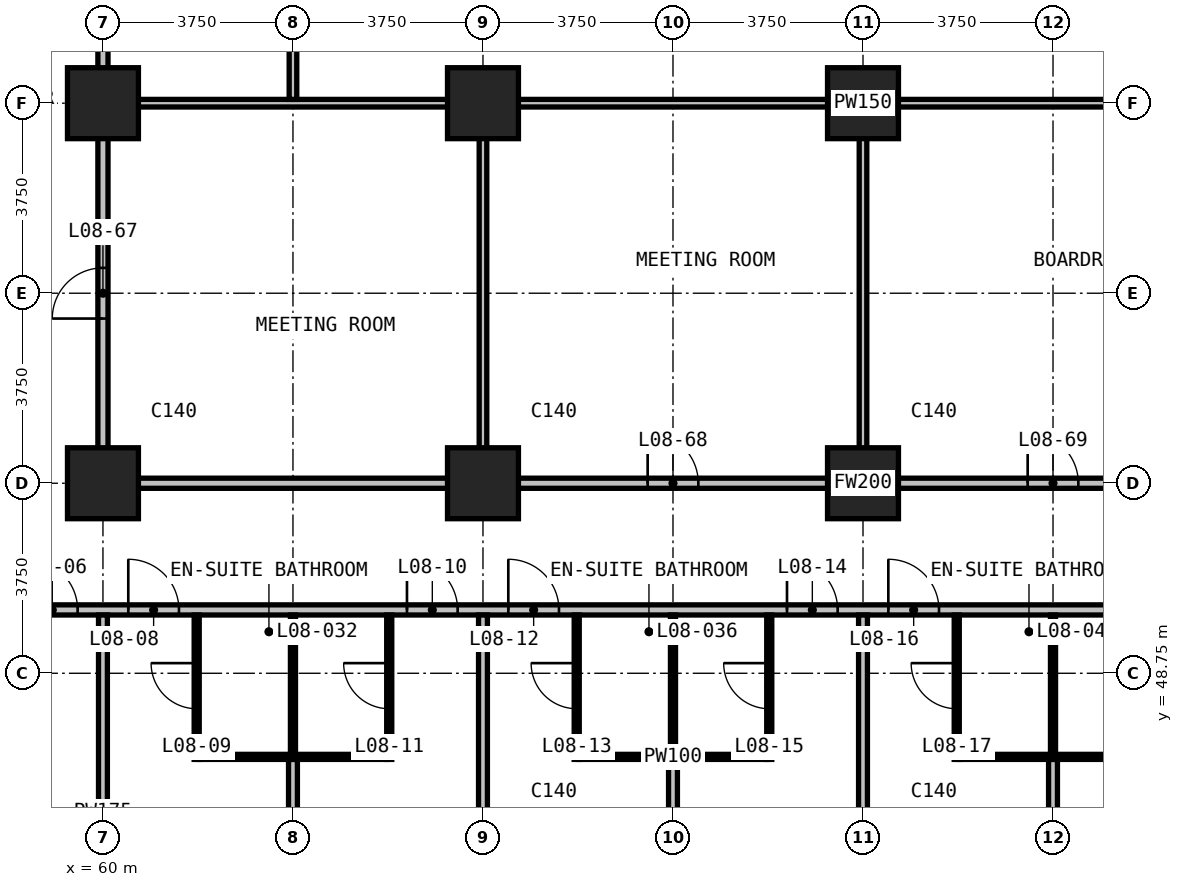
"""IFC4 building model, lengths in metres.
Left out: names, types, materials, properties, quantities, classifications, styles, units other than length and angle.
Written with IfcOpenShell. Run it as: python <this file> out.ifc"""

import sys

from ifc_helpers import new_model, si_unit, direction, frame, frame_2d, origin, origin_2d, place, context, subcontext, project, spatial, rectangle, extrude, element, fill, save


model = new_model("IFC4")
c1 = context("Model", 3, precision=1e-05, world=origin(), true_north=direction((0.0, 1.0)))
c2 = subcontext(c1, "Body", "Model", "MODEL_VIEW")
j1 = project(units=[si_unit("LENGTHUNIT", "METRE"), si_unit("PLANEANGLEUNIT", "RADIAN")], contexts=[c1])
p1 = place(None, origin())
s1 = spatial("IfcSite", under=j1, at=p1, CompositionType="ELEMENT")
p2 = place(p1, origin())
s2 = spatial("IfcBuilding", under=s1, at=p2, CompositionType="ELEMENT")
p3 = place(p2, frame((0.0, 0.0, 46.1)))
s3 = spatial("IfcBuildingStorey", under=s2, at=p3, CompositionType="ELEMENT", Elevation=46.1)
for number, where, z_axis, x_axis in (
    (1, (60.0, 52.5, 0.0), (0.0, 0.0, 1.0), (1.0, 0.0, 0.0)),
    (2, (60.0, 60.0, 0.0), (0.0, 0.0, 1.0), (1.0, 0.0, 0.0)),
    (3, (67.5, 52.5, 0.0), (0.0, 0.0, 1.0), (1.0, 0.0, 0.0)),
    (4, (67.5, 60.0, 0.0), (0.0, 0.0, 1.0), (1.0, 0.0, 0.0)),
    (5, (75.0, 52.5, 0.0), (0.0, 0.0, 1.0), (1.0, 0.0, 0.0)),
    (6, (75.0, 60.0, 0.0), (0.0, 0.0, 1.0), (1.0, 0.0, 0.0)),
):
    element("IfcColumn", number, at=place(p3, frame(where, z_axis=z_axis, x_axis=x_axis)), inside=s3, PredefinedType="COLUMN", context=c2, shape_type="SweptSolid", body=[
        extrude(rectangle(XDim=1.4, YDim=1.4, at=origin_2d()), origin(), (0.0, 0.0, 1.0), 3.3),
    ])
p4 = place(p3, frame((52.575, 50.0, 0.0), z_axis=(0.0, 0.0, 1.0), x_axis=(1.0, 0.0, 0.0)))
e7 = element("IfcWall", 7, at=p4, inside=s3, PredefinedType="PARTITIONING", context=c2, shape_type="SweptSolid", body=[
    extrude(rectangle(XDim=44.85, YDim=0.2, at=frame_2d((22.425, 0.0))), origin(), (0.0, 0.0, 1.0), 3.0),
])
p5 = place(p4, frame((5.925, 0.0, 0.0)))
e8 = element("IfcOpeningElement", 8, at=p5, cuts=e7, PredefinedType="OPENING", context=c2, shape_type="SweptSolid", body=[
    extrude(rectangle(XDim=1.0, YDim=2.2, at=frame_2d((0.5, 1.1))), frame((0.0, 0.11, 0.0), z_axis=(0.0, -1.0, 0.0), x_axis=(1.0, 0.0, 0.0)), (0.0, 0.0, 1.0), 0.22),
])
p6 = place(p4, frame((7.925, 0.0, 0.0)))
e9 = element("IfcOpeningElement", 9, at=p6, cuts=e7, PredefinedType="OPENING", context=c2, shape_type="SweptSolid", body=[
    extrude(rectangle(XDim=1.0, YDim=2.2, at=frame_2d((0.5, 1.1))), frame((0.0, 0.11, 0.0), z_axis=(0.0, -1.0, 0.0), x_axis=(1.0, 0.0, 0.0)), (0.0, 0.0, 1.0), 0.22),
])
p7 = place(p4, frame((13.425, 0.0, 0.0)))
e10 = element("IfcOpeningElement", 10, at=p7, cuts=e7, PredefinedType="OPENING", context=c2, shape_type="SweptSolid", body=[
    extrude(rectangle(XDim=1.0, YDim=2.2, at=frame_2d((0.5, 1.1))), frame((0.0, 0.11, 0.0), z_axis=(0.0, -1.0, 0.0), x_axis=(1.0, 0.0, 0.0)), (0.0, 0.0, 1.0), 0.22),
])
p8 = place(p4, frame((15.425, 0.0, 0.0)))
e11 = element("IfcOpeningElement", 11, at=p8, cuts=e7, PredefinedType="OPENING", context=c2, shape_type="SweptSolid", body=[
    extrude(rectangle(XDim=1.0, YDim=2.2, at=frame_2d((0.5, 1.1))), frame((0.0, 0.11, 0.0), z_axis=(0.0, -1.0, 0.0), x_axis=(1.0, 0.0, 0.0)), (0.0, 0.0, 1.0), 0.22),
])
p9 = place(p4, frame((20.925, 0.0, 0.0)))
e12 = element("IfcOpeningElement", 12, at=p9, cuts=e7, PredefinedType="OPENING", context=c2, shape_type="SweptSolid", body=[
    extrude(rectangle(XDim=1.0, YDim=2.2, at=frame_2d((0.5, 1.1))), frame((0.0, 0.11, 0.0), z_axis=(0.0, -1.0, 0.0), x_axis=(1.0, 0.0, 0.0)), (0.0, 0.0, 1.0), 0.22),
])
p10 = place(p4, frame((22.925, 0.0, 0.0)))
e13 = element("IfcOpeningElement", 13, at=p10, cuts=e7, PredefinedType="OPENING", context=c2, shape_type="SweptSolid", body=[
    extrude(rectangle(XDim=1.0, YDim=2.2, at=frame_2d((0.5, 1.1))), frame((0.0, 0.11, 0.0), z_axis=(0.0, -1.0, 0.0), x_axis=(1.0, 0.0, 0.0)), (0.0, 0.0, 1.0), 0.22),
])
p11 = place(p4, frame((28.425, 0.0, 0.0)))
e14 = element("IfcOpeningElement", 14, at=p11, cuts=e7, PredefinedType="OPENING", context=c2, shape_type="SweptSolid", body=[
    extrude(rectangle(XDim=1.0, YDim=2.2, at=frame_2d((0.5, 1.1))), frame((0.0, 0.11, 0.0), z_axis=(0.0, -1.0, 0.0), x_axis=(1.0, 0.0, 0.0)), (0.0, 0.0, 1.0), 0.22),
])
p12 = place(p4, frame((30.425, 0.0, 0.0)))
e15 = element("IfcOpeningElement", 15, at=p12, cuts=e7, PredefinedType="OPENING", context=c2, shape_type="SweptSolid", body=[
    extrude(rectangle(XDim=1.0, YDim=2.2, at=frame_2d((0.5, 1.1))), frame((0.0, 0.11, 0.0), z_axis=(0.0, -1.0, 0.0), x_axis=(1.0, 0.0, 0.0)), (0.0, 0.0, 1.0), 0.22),
])
p13 = place(p4, frame((35.925, 0.0, 0.0)))
e16 = element("IfcOpeningElement", 16, at=p13, cuts=e7, PredefinedType="OPENING", context=c2, shape_type="SweptSolid", body=[
    extrude(rectangle(XDim=1.0, YDim=2.2, at=frame_2d((0.5, 1.1))), frame((0.0, 0.11, 0.0), z_axis=(0.0, -1.0, 0.0), x_axis=(1.0, 0.0, 0.0)), (0.0, 0.0, 1.0), 0.22),
])
p14 = place(p4, frame((37.925, 0.0, 0.0)))
e17 = element("IfcOpeningElement", 17, at=p14, cuts=e7, PredefinedType="OPENING", context=c2, shape_type="SweptSolid", body=[
    extrude(rectangle(XDim=1.0, YDim=2.2, at=frame_2d((0.5, 1.1))), frame((0.0, 0.11, 0.0), z_axis=(0.0, -1.0, 0.0), x_axis=(1.0, 0.0, 0.0)), (0.0, 0.0, 1.0), 0.22),
])
p15 = place(p4, frame((1.4, 0.0, 0.0)))
e18 = element("IfcOpeningElement", 18, at=p15, cuts=e7, PredefinedType="OPENING", context=c2, shape_type="SweptSolid", body=[
    extrude(rectangle(XDim=0.9, YDim=2.2, at=frame_2d((0.45, 1.1))), frame((0.0, 0.11, 0.0), z_axis=(0.0, -1.0, 0.0), x_axis=(1.0, 0.0, 0.0)), (0.0, 0.0, 1.0), 0.22),
])
p16 = place(p4, frame((42.575, 0.0, 0.0)))
e19 = element("IfcOpeningElement", 19, at=p16, cuts=e7, PredefinedType="OPENING", context=c2, shape_type="SweptSolid", body=[
    extrude(rectangle(XDim=0.9, YDim=2.2, at=frame_2d((0.45, 1.1))), frame((0.0, 0.11, 0.0), z_axis=(0.0, -1.0, 0.0), x_axis=(1.0, 0.0, 0.0)), (0.0, 0.0, 1.0), 0.22),
])
p17 = place(p3, frame((60.1, 52.5, 0.0), z_axis=(0.0, 0.0, 1.0), x_axis=(1.0, 0.0, 0.0)))
e20 = element("IfcWall", 20, at=p17, inside=s3, PredefinedType="PARTITIONING", context=c2, shape_type="SweptSolid", body=[
    extrude(rectangle(XDim=29.8, YDim=0.2, at=frame_2d((14.9, 0.0))), origin(), (0.0, 0.0, 1.0), 3.0),
])
p18 = place(p17, frame((10.65, 0.0, 0.0)))
e21 = element("IfcOpeningElement", 21, at=p18, cuts=e20, PredefinedType="OPENING", context=c2, shape_type="SweptSolid", body=[
    extrude(rectangle(XDim=1.0, YDim=2.2, at=frame_2d((0.5, 1.1))), frame((0.0, 0.11, 0.0), z_axis=(0.0, -1.0, 0.0), x_axis=(1.0, 0.0, 0.0)), (0.0, 0.0, 1.0), 0.22),
])
p19 = place(p17, frame((18.15, 0.0, 0.0)))
e22 = element("IfcOpeningElement", 22, at=p19, cuts=e20, PredefinedType="OPENING", context=c2, shape_type="SweptSolid", body=[
    extrude(rectangle(XDim=1.0, YDim=2.2, at=frame_2d((0.5, 1.1))), frame((0.0, 0.11, 0.0), z_axis=(0.0, -1.0, 0.0), x_axis=(1.0, 0.0, 0.0)), (0.0, 0.0, 1.0), 0.22),
])
p20 = place(p3, frame((60.0, 52.4, 0.0), z_axis=(0.0, 0.0, 1.0), x_axis=(0.0, 1.0, 0.0)))
e23 = element("IfcWall", 23, at=p20, inside=s3, PredefinedType="PARTITIONING", context=c2, shape_type="SweptSolid", body=[
    extrude(rectangle(XDim=18.84, YDim=0.2, at=frame_2d((9.42, 0.0))), origin(), (0.0, 0.0, 1.0), 3.0),
])
p21 = place(p20, frame((3.35, 0.0, 0.0)))
e24 = element("IfcOpeningElement", 24, at=p21, cuts=e23, PredefinedType="OPENING", context=c2, shape_type="SweptSolid", body=[
    extrude(rectangle(XDim=1.0, YDim=2.2, at=frame_2d((0.5, 1.1))), frame((0.0, 0.11, 0.0), z_axis=(0.0, -1.0, 0.0), x_axis=(1.0, 0.0, 0.0)), (0.0, 0.0, 1.0), 0.22),
])
p22 = place(p20, frame((10.9, 0.0, 0.0)))
e25 = element("IfcOpeningElement", 25, at=p22, cuts=e23, PredefinedType="OPENING", context=c2, shape_type="SweptSolid", body=[
    extrude(rectangle(XDim=0.9, YDim=2.2, at=frame_2d((0.45, 1.1))), frame((0.0, 0.11, 0.0), z_axis=(0.0, -1.0, 0.0), x_axis=(1.0, 0.0, 0.0)), (0.0, 0.0, 1.0), 0.22),
])
p23 = place(p20, frame((16.5, 0.0, 0.0)))
e26 = element("IfcOpeningElement", 26, at=p23, cuts=e23, PredefinedType="OPENING", context=c2, shape_type="SweptSolid", body=[
    extrude(rectangle(XDim=0.9, YDim=2.2, at=frame_2d((0.45, 1.1))), frame((0.0, 0.11, 0.0), z_axis=(0.0, -1.0, 0.0), x_axis=(1.0, 0.0, 0.0)), (0.0, 0.0, 1.0), 0.22),
])
p24 = place(p3, frame((60.0, 40.485, 0.0), z_axis=(0.0, 0.0, 1.0), x_axis=(0.0, 1.0, 0.0)))
e27 = element("IfcWall", 27, at=p24, inside=s3, PredefinedType="PARTITIONING", context=c2, shape_type="SweptSolid", body=[
    extrude(rectangle(XDim=9.415, YDim=0.175, at=frame_2d((4.708, 0.0))), origin(), (0.0, 0.0, 1.0), 3.0),
])
p25 = place(p3, frame((63.75, 40.485, 0.0), z_axis=(0.0, 0.0, 1.0), x_axis=(0.0, 1.0, 0.0)))
e28 = element("IfcWall", 28, at=p25, inside=s3, PredefinedType="PARTITIONING", context=c2, shape_type="SweptSolid", body=[
    extrude(rectangle(XDim=6.565, YDim=0.175, at=frame_2d((3.282, 0.0))), origin(), (0.0, 0.0, 1.0), 3.0),
])
p26 = place(p3, frame((67.5, 40.485, 0.0), z_axis=(0.0, 0.0, 1.0), x_axis=(0.0, 1.0, 0.0)))
e29 = element("IfcWall", 29, at=p26, inside=s3, PredefinedType="PARTITIONING", context=c2, shape_type="SweptSolid", body=[
    extrude(rectangle(XDim=9.415, YDim=0.175, at=frame_2d((4.708, 0.0))), origin(), (0.0, 0.0, 1.0), 3.0),
])
p27 = place(p3, frame((71.25, 40.485, 0.0), z_axis=(0.0, 0.0, 1.0), x_axis=(0.0, 1.0, 0.0)))
e30 = element("IfcWall", 30, at=p27, inside=s3, PredefinedType="PARTITIONING", context=c2, shape_type="SweptSolid", body=[
    extrude(rectangle(XDim=6.565, YDim=0.175, at=frame_2d((3.282, 0.0))), origin(), (0.0, 0.0, 1.0), 3.0),
])
p28 = place(p3, frame((75.0, 40.485, 0.0), z_axis=(0.0, 0.0, 1.0), x_axis=(0.0, 1.0, 0.0)))
e31 = element("IfcWall", 31, at=p28, inside=s3, PredefinedType="PARTITIONING", context=c2, shape_type="SweptSolid", body=[
    extrude(rectangle(XDim=9.415, YDim=0.175, at=frame_2d((4.708, 0.0))), origin(), (0.0, 0.0, 1.0), 3.0),
])
p29 = place(p3, frame((78.75, 40.485, 0.0), z_axis=(0.0, 0.0, 1.0), x_axis=(0.0, 1.0, 0.0)))
e32 = element("IfcWall", 32, at=p29, inside=s3, PredefinedType="PARTITIONING", context=c2, shape_type="SweptSolid", body=[
    extrude(rectangle(XDim=6.565, YDim=0.175, at=frame_2d((3.282, 0.0))), origin(), (0.0, 0.0, 1.0), 3.0),
])
p30 = place(p3, frame((60.1, 60.0, 0.0), z_axis=(0.0, 0.0, 1.0), x_axis=(1.0, 0.0, 0.0)))
e33 = element("IfcWall", 33, at=p30, inside=s3, PredefinedType="PARTITIONING", context=c2, shape_type="SweptSolid", body=[
    extrude(rectangle(XDim=29.8, YDim=0.15, at=frame_2d((14.9, 0.0))), origin(), (0.0, 0.0, 1.0), 3.0),
])
p31 = place(p3, frame((63.75, 60.075, 0.0), z_axis=(0.0, 0.0, 1.0), x_axis=(0.0, 1.0, 0.0)))
e34 = element("IfcWall", 34, at=p31, inside=s3, PredefinedType="PARTITIONING", context=c2, shape_type="SweptSolid", body=[
    extrude(rectangle(XDim=11.165, YDim=0.15, at=frame_2d((5.583, 0.0))), origin(), (0.0, 0.0, 1.0), 3.0),
])
for number, where, z_axis, x_axis in (
    (35, (67.5, 52.6, 0.0), (0.0, 0.0, 1.0), (0.0, 1.0, 0.0)),
    (36, (75.0, 52.6, 0.0), (0.0, 0.0, 1.0), (0.0, 1.0, 0.0)),
):
    element("IfcWall", number, at=place(p3, frame(where, z_axis=z_axis, x_axis=x_axis)), inside=s3, PredefinedType="PARTITIONING", context=c2, shape_type="SweptSolid", body=[
        extrude(rectangle(XDim=7.325, YDim=0.15, at=frame_2d((3.663, 0.0))), origin(), (0.0, 0.0, 1.0), 3.0),
    ])
for number, where, z_axis, x_axis in (
    (37, (61.9, 47.1, 0.0), (0.0, 0.0, 1.0), (1.0, 0.0, 0.0)),
    (38, (69.4, 47.1, 0.0), (0.0, 0.0, 1.0), (1.0, 0.0, 0.0)),
    (39, (76.9, 47.1, 0.0), (0.0, 0.0, 1.0), (1.0, 0.0, 0.0)),
):
    element("IfcWall", number, at=place(p3, frame(where, z_axis=z_axis, x_axis=x_axis)), inside=s3, PredefinedType="PARTITIONING", context=c2, shape_type="SweptSolid", body=[
        extrude(rectangle(XDim=3.7, YDim=0.1, at=frame_2d((1.85, 0.0))), origin(), (0.0, 0.0, 1.0), 3.0),
    ])
p32 = place(p3, frame((61.85, 47.05, 0.0), z_axis=(0.0, 0.0, 1.0), x_axis=(0.0, 1.0, 0.0)))
e40 = element("IfcWall", 40, at=p32, inside=s3, PredefinedType="PARTITIONING", context=c2, shape_type="SweptSolid", body=[
    extrude(rectangle(XDim=2.85, YDim=0.1, at=frame_2d((1.425, 0.0))), origin(), (0.0, 0.0, 1.0), 3.0),
])
p33 = place(p32, frame((1.0, 0.0, 0.0)))
e41 = element("IfcOpeningElement", 41, at=p33, cuts=e40, PredefinedType="OPENING", context=c2, shape_type="SweptSolid", body=[
    extrude(rectangle(XDim=0.9, YDim=2.2, at=frame_2d((0.45, 1.1))), frame((0.0, 0.06, 0.0), z_axis=(0.0, -1.0, 0.0), x_axis=(1.0, 0.0, 0.0)), (0.0, 0.0, 1.0), 0.12),
])
p34 = place(p3, frame((63.75, 47.15, 0.0), z_axis=(0.0, 0.0, 1.0), x_axis=(0.0, 1.0, 0.0)))
e42 = element("IfcWall", 42, at=p34, inside=s3, PredefinedType="PARTITIONING", context=c2, shape_type="SweptSolid", body=[
    extrude(rectangle(XDim=2.75, YDim=0.1, at=frame_2d((1.375, 0.0))), origin(), (0.0, 0.0, 1.0), 3.0),
])
p35 = place(p3, frame((65.65, 47.05, 0.0), z_axis=(0.0, 0.0, 1.0), x_axis=(0.0, 1.0, 0.0)))
e43 = element("IfcWall", 43, at=p35, inside=s3, PredefinedType="PARTITIONING", context=c2, shape_type="SweptSolid", body=[
    extrude(rectangle(XDim=2.85, YDim=0.1, at=frame_2d((1.425, 0.0))), origin(), (0.0, 0.0, 1.0), 3.0),
])
p36 = place(p35, frame((1.0, 0.0, 0.0)))
e44 = element("IfcOpeningElement", 44, at=p36, cuts=e43, PredefinedType="OPENING", context=c2, shape_type="SweptSolid", body=[
    extrude(rectangle(XDim=0.9, YDim=2.2, at=frame_2d((0.45, 1.1))), frame((0.0, 0.06, 0.0), z_axis=(0.0, -1.0, 0.0), x_axis=(1.0, 0.0, 0.0)), (0.0, 0.0, 1.0), 0.12),
])
p37 = place(p3, frame((69.35, 47.05, 0.0), z_axis=(0.0, 0.0, 1.0), x_axis=(0.0, 1.0, 0.0)))
e45 = element("IfcWall", 45, at=p37, inside=s3, PredefinedType="PARTITIONING", context=c2, shape_type="SweptSolid", body=[
    extrude(rectangle(XDim=2.85, YDim=0.1, at=frame_2d((1.425, 0.0))), origin(), (0.0, 0.0, 1.0), 3.0),
])
p38 = place(p37, frame((1.0, 0.0, 0.0)))
e46 = element("IfcOpeningElement", 46, at=p38, cuts=e45, PredefinedType="OPENING", context=c2, shape_type="SweptSolid", body=[
    extrude(rectangle(XDim=0.9, YDim=2.2, at=frame_2d((0.45, 1.1))), frame((0.0, 0.06, 0.0), z_axis=(0.0, -1.0, 0.0), x_axis=(1.0, 0.0, 0.0)), (0.0, 0.0, 1.0), 0.12),
])
p39 = place(p3, frame((71.25, 47.15, 0.0), z_axis=(0.0, 0.0, 1.0), x_axis=(0.0, 1.0, 0.0)))
e47 = element("IfcWall", 47, at=p39, inside=s3, PredefinedType="PARTITIONING", context=c2, shape_type="SweptSolid", body=[
    extrude(rectangle(XDim=2.75, YDim=0.1, at=frame_2d((1.375, 0.0))), origin(), (0.0, 0.0, 1.0), 3.0),
])
p40 = place(p3, frame((73.15, 47.05, 0.0), z_axis=(0.0, 0.0, 1.0), x_axis=(0.0, 1.0, 0.0)))
e48 = element("IfcWall", 48, at=p40, inside=s3, PredefinedType="PARTITIONING", context=c2, shape_type="SweptSolid", body=[
    extrude(rectangle(XDim=2.85, YDim=0.1, at=frame_2d((1.425, 0.0))), origin(), (0.0, 0.0, 1.0), 3.0),
])
p41 = place(p40, frame((1.0, 0.0, 0.0)))
e49 = element("IfcOpeningElement", 49, at=p41, cuts=e48, PredefinedType="OPENING", context=c2, shape_type="SweptSolid", body=[
    extrude(rectangle(XDim=0.9, YDim=2.2, at=frame_2d((0.45, 1.1))), frame((0.0, 0.06, 0.0), z_axis=(0.0, -1.0, 0.0), x_axis=(1.0, 0.0, 0.0)), (0.0, 0.0, 1.0), 0.12),
])
p42 = place(p3, frame((76.85, 47.05, 0.0), z_axis=(0.0, 0.0, 1.0), x_axis=(0.0, 1.0, 0.0)))
e50 = element("IfcWall", 50, at=p42, inside=s3, PredefinedType="PARTITIONING", context=c2, shape_type="SweptSolid", body=[
    extrude(rectangle(XDim=2.85, YDim=0.1, at=frame_2d((1.425, 0.0))), origin(), (0.0, 0.0, 1.0), 3.0),
])
p43 = place(p42, frame((1.0, 0.0, 0.0)))
e51 = element("IfcOpeningElement", 51, at=p43, cuts=e50, PredefinedType="OPENING", context=c2, shape_type="SweptSolid", body=[
    extrude(rectangle(XDim=0.9, YDim=2.2, at=frame_2d((0.45, 1.1))), frame((0.0, 0.06, 0.0), z_axis=(0.0, -1.0, 0.0), x_axis=(1.0, 0.0, 0.0)), (0.0, 0.0, 1.0), 0.12),
])
p44 = place(p3, frame((78.75, 47.15, 0.0), z_axis=(0.0, 0.0, 1.0), x_axis=(0.0, 1.0, 0.0)))
e52 = element("IfcWall", 52, at=p44, inside=s3, PredefinedType="PARTITIONING", context=c2, shape_type="SweptSolid", body=[
    extrude(rectangle(XDim=2.75, YDim=0.1, at=frame_2d((1.375, 0.0))), origin(), (0.0, 0.0, 1.0), 3.0),
])
p45 = place(p5, origin())
e53 = element("IfcDoor", 53, at=p45, inside=s3, OperationType="SINGLE_SWING_RIGHT", PredefinedType="DOOR", context=c2, shape_type="SweptSolid", body=[
    extrude(rectangle(XDim=1.0, YDim=2.2, at=frame_2d((0.5, 1.1))), frame((0.0, 0.025, 0.0), z_axis=(0.0, -1.0, 0.0), x_axis=(1.0, 0.0, 0.0)), (0.0, 0.0, 1.0), 0.05),
])
fill(e8, e53)
p46 = place(p6, origin())
e54 = element("IfcDoor", 54, at=p46, inside=s3, OperationType="SINGLE_SWING_RIGHT", PredefinedType="DOOR", context=c2, shape_type="SweptSolid", body=[
    extrude(rectangle(XDim=1.0, YDim=2.2, at=frame_2d((0.5, 1.1))), frame((0.0, 0.025, 0.0), z_axis=(0.0, -1.0, 0.0), x_axis=(1.0, 0.0, 0.0)), (0.0, 0.0, 1.0), 0.05),
])
fill(e9, e54)
p47 = place(p33, origin())
e55 = element("IfcDoor", 55, at=p47, inside=s3, OperationType="SINGLE_SWING_RIGHT", PredefinedType="DOOR", context=c2, shape_type="SweptSolid", body=[
    extrude(rectangle(XDim=0.9, YDim=2.2, at=frame_2d((0.45, 1.1))), frame((0.0, 0.025, 0.0), z_axis=(0.0, -1.0, 0.0), x_axis=(1.0, 0.0, 0.0)), (0.0, 0.0, 1.0), 0.05),
])
fill(e41, e55)
p48 = place(p7, origin())
e56 = element("IfcDoor", 56, at=p48, inside=s3, OperationType="SINGLE_SWING_LEFT", PredefinedType="DOOR", context=c2, shape_type="SweptSolid", body=[
    extrude(rectangle(XDim=1.0, YDim=2.2, at=frame_2d((0.5, 1.1))), frame((0.0, 0.025, 0.0), z_axis=(0.0, -1.0, 0.0), x_axis=(1.0, 0.0, 0.0)), (0.0, 0.0, 1.0), 0.05),
])
fill(e10, e56)
p49 = place(p36, origin())
e57 = element("IfcDoor", 57, at=p49, inside=s3, OperationType="SINGLE_SWING_RIGHT", PredefinedType="DOOR", context=c2, shape_type="SweptSolid", body=[
    extrude(rectangle(XDim=0.9, YDim=2.2, at=frame_2d((0.45, 1.1))), frame((0.0, 0.025, 0.0), z_axis=(0.0, -1.0, 0.0), x_axis=(1.0, 0.0, 0.0)), (0.0, 0.0, 1.0), 0.05),
])
fill(e44, e57)
p50 = place(p8, origin())
e58 = element("IfcDoor", 58, at=p50, inside=s3, OperationType="SINGLE_SWING_RIGHT", PredefinedType="DOOR", context=c2, shape_type="SweptSolid", body=[
    extrude(rectangle(XDim=1.0, YDim=2.2, at=frame_2d((0.5, 1.1))), frame((0.0, 0.025, 0.0), z_axis=(0.0, -1.0, 0.0), x_axis=(1.0, 0.0, 0.0)), (0.0, 0.0, 1.0), 0.05),
])
fill(e11, e58)
p51 = place(p38, origin())
e59 = element("IfcDoor", 59, at=p51, inside=s3, OperationType="SINGLE_SWING_RIGHT", PredefinedType="DOOR", context=c2, shape_type="SweptSolid", body=[
    extrude(rectangle(XDim=0.9, YDim=2.2, at=frame_2d((0.45, 1.1))), frame((0.0, 0.025, 0.0), z_axis=(0.0, -1.0, 0.0), x_axis=(1.0, 0.0, 0.0)), (0.0, 0.0, 1.0), 0.05),
])
fill(e46, e59)
p52 = place(p9, origin())
e60 = element("IfcDoor", 60, at=p52, inside=s3, OperationType="SINGLE_SWING_LEFT", PredefinedType="DOOR", context=c2, shape_type="SweptSolid", body=[
    extrude(rectangle(XDim=1.0, YDim=2.2, at=frame_2d((0.5, 1.1))), frame((0.0, 0.025, 0.0), z_axis=(0.0, -1.0, 0.0), x_axis=(1.0, 0.0, 0.0)), (0.0, 0.0, 1.0), 0.05),
])
fill(e12, e60)
p53 = place(p41, origin())
e61 = element("IfcDoor", 61, at=p53, inside=s3, OperationType="SINGLE_SWING_RIGHT", PredefinedType="DOOR", context=c2, shape_type="SweptSolid", body=[
    extrude(rectangle(XDim=0.9, YDim=2.2, at=frame_2d((0.45, 1.1))), frame((0.0, 0.025, 0.0), z_axis=(0.0, -1.0, 0.0), x_axis=(1.0, 0.0, 0.0)), (0.0, 0.0, 1.0), 0.05),
])
fill(e49, e61)
p54 = place(p10, origin())
e62 = element("IfcDoor", 62, at=p54, inside=s3, OperationType="SINGLE_SWING_LEFT", PredefinedType="DOOR", context=c2, shape_type="SweptSolid", body=[
    extrude(rectangle(XDim=1.0, YDim=2.2, at=frame_2d((0.5, 1.1))), frame((0.0, 0.025, 0.0), z_axis=(0.0, -1.0, 0.0), x_axis=(1.0, 0.0, 0.0)), (0.0, 0.0, 1.0), 0.05),
])
fill(e13, e62)
p55 = place(p43, origin())
e63 = element("IfcDoor", 63, at=p55, inside=s3, OperationType="SINGLE_SWING_RIGHT", PredefinedType="DOOR", context=c2, shape_type="SweptSolid", body=[
    extrude(rectangle(XDim=0.9, YDim=2.2, at=frame_2d((0.45, 1.1))), frame((0.0, 0.025, 0.0), z_axis=(0.0, -1.0, 0.0), x_axis=(1.0, 0.0, 0.0)), (0.0, 0.0, 1.0), 0.05),
])
fill(e51, e63)
p56 = place(p21, origin())
e64 = element("IfcDoor", 64, at=p56, inside=s3, OperationType="SINGLE_SWING_LEFT", PredefinedType="DOOR", context=c2, shape_type="SweptSolid", body=[
    extrude(rectangle(XDim=1.0, YDim=2.2, at=frame_2d((0.5, 1.1))), frame((0.0, 0.025, 0.0), z_axis=(0.0, -1.0, 0.0), x_axis=(1.0, 0.0, 0.0)), (0.0, 0.0, 1.0), 0.05),
])
fill(e24, e64)
p57 = place(p18, origin())
e65 = element("IfcDoor", 65, at=p57, inside=s3, OperationType="SINGLE_SWING_LEFT", PredefinedType="DOOR", context=c2, shape_type="SweptSolid", body=[
    extrude(rectangle(XDim=1.0, YDim=2.2, at=frame_2d((0.5, 1.1))), frame((0.0, 0.025, 0.0), z_axis=(0.0, -1.0, 0.0), x_axis=(1.0, 0.0, 0.0)), (0.0, 0.0, 1.0), 0.05),
])
fill(e21, e65)
p58 = place(p19, origin())
e66 = element("IfcDoor", 66, at=p58, inside=s3, OperationType="SINGLE_SWING_LEFT", PredefinedType="DOOR", context=c2, shape_type="SweptSolid", body=[
    extrude(rectangle(XDim=1.0, YDim=2.2, at=frame_2d((0.5, 1.1))), frame((0.0, 0.025, 0.0), z_axis=(0.0, -1.0, 0.0), x_axis=(1.0, 0.0, 0.0)), (0.0, 0.0, 1.0), 0.05),
])
fill(e22, e66)
save(model, sys.argv[1])
